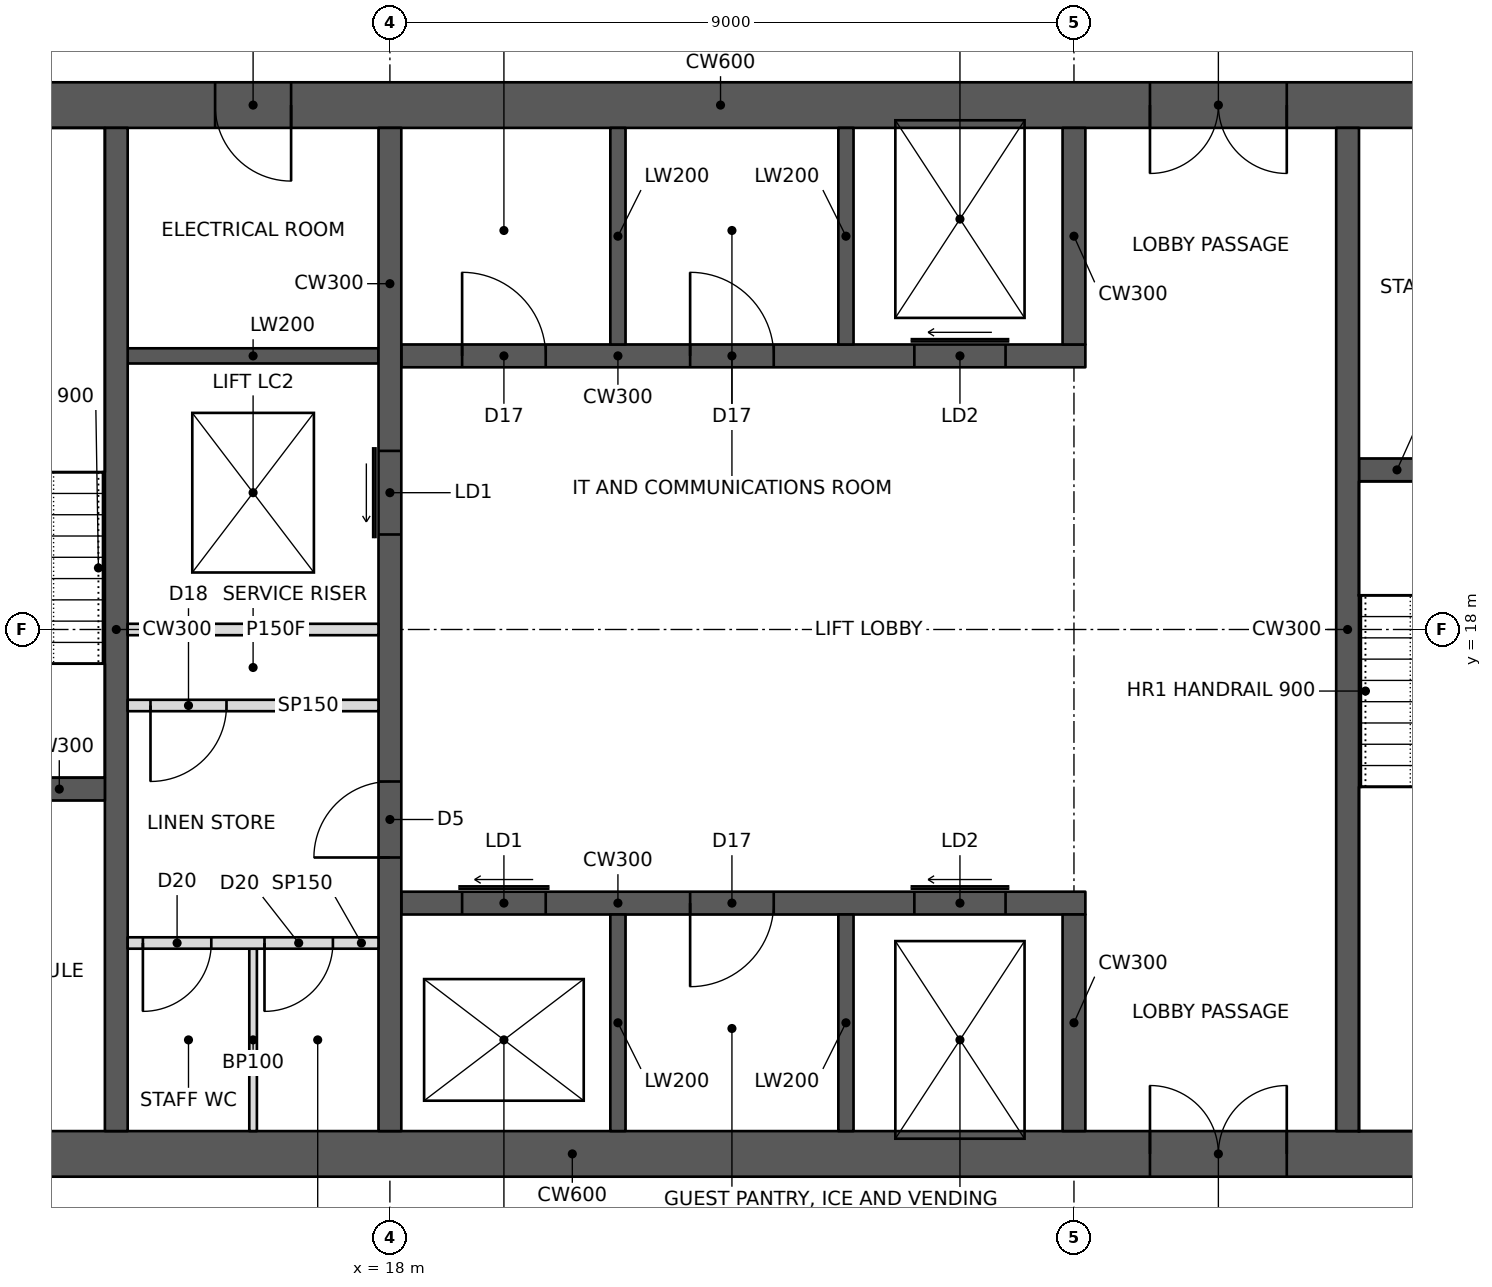
"""IFC4 building model, lengths in metres.
Left out: names, types, materials, properties, quantities, classifications, styles, units other than length and angle.
Written with IfcOpenShell. Run it as: python <this file> out.ifc"""

import sys

from ifc_helpers import new_model, si_unit, direction, frame, frame_2d, origin, place, context, subcontext, project, spatial, rectangle, extrude, element, fill, save


model = new_model("IFC4")
c1 = context("Model", 3, precision=1e-05, world=origin(), true_north=direction((0.0, 1.0)))
c2 = subcontext(c1, "Body", "Model", "MODEL_VIEW")
j1 = project(units=[si_unit("LENGTHUNIT", "METRE"), si_unit("PLANEANGLEUNIT", "RADIAN")], contexts=[c1])
p1 = place(None, origin())
s1 = spatial("IfcSite", under=j1, at=p1, CompositionType="ELEMENT")
p2 = place(p1, origin())
s2 = spatial("IfcBuilding", under=s1, at=p2, CompositionType="ELEMENT")
p3 = place(p2, frame((0.0, 0.0, 167.2)))
s3 = spatial("IfcBuildingStorey", under=s2, at=p3, CompositionType="ELEMENT", Elevation=167.2)
p4 = place(p3, frame((10.8, 11.1, 0.0), z_axis=(0.0, 0.0, 1.0), x_axis=(1.0, 0.0, 0.0)))
e1 = element("IfcWall", 1, at=p4, inside=s3, PredefinedType="SHEAR", context=c2, shape_type="SweptSolid", body=[
    extrude(rectangle(XDim=23.4, YDim=0.6, at=frame_2d((11.7, 0.0))), origin(), (0.0, 0.0, 1.0), 3.4),
])
p5 = place(p4, frame((1.0, 0.0, 0.0)))
e2 = element("IfcOpeningElement", 2, at=p5, cuts=e1, PredefinedType="OPENING", context=c2, shape_type="SweptSolid", body=[
    extrude(rectangle(XDim=1.0, YDim=2.1, at=frame_2d((0.5, 1.05))), frame((0.0, 0.31, 0.0), z_axis=(0.0, -1.0, 0.0), x_axis=(1.0, 0.0, 0.0)), (0.0, 0.0, 1.0), 0.62),
])
p6 = place(p4, frame((17.2, 0.0, 0.0)))
e3 = element("IfcOpeningElement", 3, at=p6, cuts=e1, PredefinedType="OPENING", context=c2, shape_type="SweptSolid", body=[
    extrude(rectangle(XDim=1.8, YDim=2.1, at=frame_2d((0.9, 1.05))), frame((0.0, 0.31, 0.0), z_axis=(0.0, -1.0, 0.0), x_axis=(1.0, 0.0, 0.0)), (0.0, 0.0, 1.0), 0.62),
])
p7 = place(p3, frame((10.8, 24.9, 0.0), z_axis=(0.0, 0.0, 1.0), x_axis=(1.0, 0.0, 0.0)))
e4 = element("IfcWall", 4, at=p7, inside=s3, PredefinedType="SHEAR", context=c2, shape_type="SweptSolid", body=[
    extrude(rectangle(XDim=23.4, YDim=0.6, at=frame_2d((11.7, 0.0))), origin(), (0.0, 0.0, 1.0), 3.4),
])
p8 = place(p7, frame((17.2, 0.0, 0.0)))
e5 = element("IfcOpeningElement", 5, at=p8, cuts=e4, PredefinedType="OPENING", context=c2, shape_type="SweptSolid", body=[
    extrude(rectangle(XDim=1.8, YDim=2.1, at=frame_2d((0.9, 1.05))), frame((0.0, 0.31, 0.0), z_axis=(0.0, -1.0, 0.0), x_axis=(1.0, 0.0, 0.0)), (0.0, 0.0, 1.0), 0.62),
])
p9 = place(p7, frame((21.1, 0.0, 0.0)))
e6 = element("IfcOpeningElement", 6, at=p9, cuts=e4, PredefinedType="OPENING", context=c2, shape_type="SweptSolid", body=[
    extrude(rectangle(XDim=1.0, YDim=2.1, at=frame_2d((0.5, 1.05))), frame((0.0, 0.31, 0.0), z_axis=(0.0, -1.0, 0.0), x_axis=(1.0, 0.0, 0.0)), (0.0, 0.0, 1.0), 0.62),
])
p10 = place(p7, frame((4.9, 0.0, 0.0)))
e7 = element("IfcOpeningElement", 7, at=p10, cuts=e4, PredefinedType="OPENING", context=c2, shape_type="SweptSolid", body=[
    extrude(rectangle(XDim=1.0, YDim=2.1, at=frame_2d((0.5, 1.05))), frame((0.0, 0.31, 0.0), z_axis=(0.0, -1.0, 0.0), x_axis=(1.0, 0.0, 0.0)), (0.0, 0.0, 1.0), 0.62),
])
p11 = place(p3, frame((14.4, 11.4, 0.0), z_axis=(0.0, 0.0, 1.0), x_axis=(0.0, 1.0, 0.0)))
e8 = element("IfcWall", 8, at=p11, inside=s3, PredefinedType="SHEAR", context=c2, shape_type="SweptSolid", body=[
    extrude(rectangle(XDim=13.2, YDim=0.3, at=frame_2d((6.6, 0.0))), origin(), (0.0, 0.0, 1.0), 3.4),
])
p12 = place(p3, frame((11.4, 15.9, 0.0), z_axis=(0.0, 0.0, 1.0), x_axis=(1.0, 0.0, 0.0)))
e9 = element("IfcWall", 9, at=p12, inside=s3, PredefinedType="SHEAR", context=c2, shape_type="SweptSolid", body=[
    extrude(rectangle(XDim=2.85, YDim=0.3, at=frame_2d((1.425, 0.0))), origin(), (0.0, 0.0, 1.0), 3.4),
])
p13 = place(p12, frame((0.5, 0.0, 0.0)))
e10 = element("IfcOpeningElement", 10, at=p13, cuts=e9, PredefinedType="OPENING", context=c2, shape_type="SweptSolid", body=[
    extrude(rectangle(XDim=1.0, YDim=2.1, at=frame_2d((0.5, 1.05))), frame((0.0, 0.16, 0.0), z_axis=(0.0, -1.0, 0.0), x_axis=(1.0, 0.0, 0.0)), (0.0, 0.0, 1.0), 0.32),
])
p14 = place(p3, frame((18.0, 11.4, 0.0), z_axis=(0.0, 0.0, 1.0), x_axis=(0.0, 1.0, 0.0)))
e11 = element("IfcWall", 11, at=p14, inside=s3, PredefinedType="SHEAR", context=c2, shape_type="SweptSolid", body=[
    extrude(rectangle(XDim=13.2, YDim=0.3, at=frame_2d((6.6, 0.0))), origin(), (0.0, 0.0, 1.0), 3.4),
])
p15 = place(p14, frame((3.6, 0.0, 0.0)))
e12 = element("IfcOpeningElement", 12, at=p15, cuts=e11, PredefinedType="OPENING", context=c2, shape_type="SweptSolid", body=[
    extrude(rectangle(XDim=1.0, YDim=2.1, at=frame_2d((0.5, 1.05))), frame((0.0, 0.16, 0.0), z_axis=(0.0, -1.0, 0.0), x_axis=(1.0, 0.0, 0.0)), (0.0, 0.0, 1.0), 0.32),
])
p16 = place(p14, frame((7.85, 0.0, 0.0)))
e13 = element("IfcOpeningElement", 13, at=p16, cuts=e11, PredefinedType="OPENING", context=c2, shape_type="SweptSolid", body=[
    extrude(rectangle(XDim=1.1, YDim=2.1, at=frame_2d((0.55, 1.05))), frame((0.0, 0.16, 0.0), z_axis=(0.0, -1.0, 0.0), x_axis=(1.0, 0.0, 0.0)), (0.0, 0.0, 1.0), 0.32),
])
p17 = place(p3, frame((14.55, 18.0, 0.0), z_axis=(0.0, 0.0, 1.0), x_axis=(1.0, 0.0, 0.0)))
e14 = element("IfcWall", 14, at=p17, inside=s3, PredefinedType="PARTITIONING", context=c2, shape_type="SweptSolid", body=[
    extrude(rectangle(XDim=3.3, YDim=0.15, at=frame_2d((1.65, 0.0))), origin(), (0.0, 0.0, 1.0), 3.2),
])
p18 = place(p3, frame((18.15, 14.4, 0.0), z_axis=(0.0, 0.0, 1.0), x_axis=(1.0, 0.0, 0.0)))
e15 = element("IfcWall", 15, at=p18, inside=s3, PredefinedType="SHEAR", context=c2, shape_type="SweptSolid", body=[
    extrude(rectangle(XDim=9.0, YDim=0.3, at=frame_2d((4.5, 0.0))), origin(), (0.0, 0.0, 1.0), 3.4),
])
p19 = place(p18, frame((0.8, 0.0, 0.0)))
e16 = element("IfcOpeningElement", 16, at=p19, cuts=e15, PredefinedType="OPENING", context=c2, shape_type="SweptSolid", body=[
    extrude(rectangle(XDim=1.1, YDim=2.1, at=frame_2d((0.55, 1.05))), frame((0.0, 0.16, 0.0), z_axis=(0.0, -1.0, 0.0), x_axis=(1.0, 0.0, 0.0)), (0.0, 0.0, 1.0), 0.32),
])
p20 = place(p18, frame((6.75, 0.0, 0.0)))
e17 = element("IfcOpeningElement", 17, at=p20, cuts=e15, PredefinedType="OPENING", context=c2, shape_type="SweptSolid", body=[
    extrude(rectangle(XDim=1.2, YDim=2.1, at=frame_2d((0.6, 1.05))), frame((0.0, 0.16, 0.0), z_axis=(0.0, -1.0, 0.0), x_axis=(1.0, 0.0, 0.0)), (0.0, 0.0, 1.0), 0.32),
])
p21 = place(p18, frame((3.8, 0.0, 0.0)))
e18 = element("IfcOpeningElement", 18, at=p21, cuts=e15, PredefinedType="OPENING", context=c2, shape_type="SweptSolid", body=[
    extrude(rectangle(XDim=1.1, YDim=2.1, at=frame_2d((0.55, 1.05))), frame((0.0, 0.16, 0.0), z_axis=(0.0, -1.0, 0.0), x_axis=(1.0, 0.0, 0.0)), (0.0, 0.0, 1.0), 0.32),
])
p22 = place(p3, frame((27.0, 11.4, 0.0), z_axis=(0.0, 0.0, 1.0), x_axis=(0.0, 1.0, 0.0)))
e19 = element("IfcWall", 19, at=p22, inside=s3, PredefinedType="SHEAR", context=c2, shape_type="SweptSolid", body=[
    extrude(rectangle(XDim=2.85, YDim=0.3, at=frame_2d((1.425, 0.0))), origin(), (0.0, 0.0, 1.0), 3.4),
])
for number, where, z_axis, x_axis in (
    (20, (21.0, 11.4, 0.0), (0.0, 0.0, 1.0), (0.0, 1.0, 0.0)),
    (21, (24.0, 11.4, 0.0), (0.0, 0.0, 1.0), (0.0, 1.0, 0.0)),
):
    element("IfcWall", number, at=place(p3, frame(where, z_axis=z_axis, x_axis=x_axis)), inside=s3, PredefinedType="SHEAR", context=c2, shape_type="SweptSolid", body=[
        extrude(rectangle(XDim=2.85, YDim=0.2, at=frame_2d((1.425, 0.0))), origin(), (0.0, 0.0, 1.0), 3.4),
    ])
p23 = place(p3, frame((18.15, 21.6, 0.0), z_axis=(0.0, 0.0, 1.0), x_axis=(1.0, 0.0, 0.0)))
e22 = element("IfcWall", 22, at=p23, inside=s3, PredefinedType="SHEAR", context=c2, shape_type="SweptSolid", body=[
    extrude(rectangle(XDim=9.0, YDim=0.3, at=frame_2d((4.5, 0.0))), origin(), (0.0, 0.0, 1.0), 3.4),
])
p24 = place(p23, frame((6.75, 0.0, 0.0)))
e23 = element("IfcOpeningElement", 23, at=p24, cuts=e22, PredefinedType="OPENING", context=c2, shape_type="SweptSolid", body=[
    extrude(rectangle(XDim=1.2, YDim=2.1, at=frame_2d((0.6, 1.05))), frame((0.0, 0.16, 0.0), z_axis=(0.0, -1.0, 0.0), x_axis=(1.0, 0.0, 0.0)), (0.0, 0.0, 1.0), 0.32),
])
p25 = place(p23, frame((0.8, 0.0, 0.0)))
e24 = element("IfcOpeningElement", 24, at=p25, cuts=e22, PredefinedType="OPENING", context=c2, shape_type="SweptSolid", body=[
    extrude(rectangle(XDim=1.1, YDim=2.1, at=frame_2d((0.55, 1.05))), frame((0.0, 0.16, 0.0), z_axis=(0.0, -1.0, 0.0), x_axis=(1.0, 0.0, 0.0)), (0.0, 0.0, 1.0), 0.32),
])
p26 = place(p23, frame((3.8, 0.0, 0.0)))
e25 = element("IfcOpeningElement", 25, at=p26, cuts=e22, PredefinedType="OPENING", context=c2, shape_type="SweptSolid", body=[
    extrude(rectangle(XDim=1.1, YDim=2.1, at=frame_2d((0.55, 1.05))), frame((0.0, 0.16, 0.0), z_axis=(0.0, -1.0, 0.0), x_axis=(1.0, 0.0, 0.0)), (0.0, 0.0, 1.0), 0.32),
])
p27 = place(p3, frame((27.0, 21.75, 0.0), z_axis=(0.0, 0.0, 1.0), x_axis=(0.0, 1.0, 0.0)))
e26 = element("IfcWall", 26, at=p27, inside=s3, PredefinedType="SHEAR", context=c2, shape_type="SweptSolid", body=[
    extrude(rectangle(XDim=2.85, YDim=0.3, at=frame_2d((1.425, 0.0))), origin(), (0.0, 0.0, 1.0), 3.4),
])
for number, where, z_axis, x_axis in (
    (27, (21.0, 21.75, 0.0), (0.0, 0.0, 1.0), (0.0, 1.0, 0.0)),
    (28, (24.0, 21.75, 0.0), (0.0, 0.0, 1.0), (0.0, 1.0, 0.0)),
):
    element("IfcWall", number, at=place(p3, frame(where, z_axis=z_axis, x_axis=x_axis)), inside=s3, PredefinedType="SHEAR", context=c2, shape_type="SweptSolid", body=[
        extrude(rectangle(XDim=2.85, YDim=0.2, at=frame_2d((1.425, 0.0))), origin(), (0.0, 0.0, 1.0), 3.4),
    ])
p28 = place(p3, frame((30.6, 11.4, 0.0), z_axis=(0.0, 0.0, 1.0), x_axis=(0.0, 1.0, 0.0)))
e29 = element("IfcWall", 29, at=p28, inside=s3, PredefinedType="SHEAR", context=c2, shape_type="SweptSolid", body=[
    extrude(rectangle(XDim=13.2, YDim=0.3, at=frame_2d((6.6, 0.0))), origin(), (0.0, 0.0, 1.0), 3.4),
])
p29 = place(p3, frame((30.75, 20.1, 0.0), z_axis=(0.0, 0.0, 1.0), x_axis=(1.0, 0.0, 0.0)))
e30 = element("IfcWall", 30, at=p29, inside=s3, PredefinedType="SHEAR", context=c2, shape_type="SweptSolid", body=[
    extrude(rectangle(XDim=2.85, YDim=0.3, at=frame_2d((1.425, 0.0))), origin(), (0.0, 0.0, 1.0), 3.4),
])
p30 = place(p29, frame((1.15, 0.0, 0.0)))
e31 = element("IfcOpeningElement", 31, at=p30, cuts=e30, PredefinedType="OPENING", context=c2, shape_type="SweptSolid", body=[
    extrude(rectangle(XDim=1.0, YDim=2.1, at=frame_2d((0.5, 1.05))), frame((0.0, 0.16, 0.0), z_axis=(0.0, -1.0, 0.0), x_axis=(1.0, 0.0, 0.0)), (0.0, 0.0, 1.0), 0.32),
])
p31 = place(p3, frame((14.55, 21.6, 0.0), z_axis=(0.0, 0.0, 1.0), x_axis=(1.0, 0.0, 0.0)))
e32 = element("IfcWall", 32, at=p31, inside=s3, PredefinedType="SHEAR", context=c2, shape_type="SweptSolid", body=[
    extrude(rectangle(XDim=3.3, YDim=0.2, at=frame_2d((1.65, 0.0))), origin(), (0.0, 0.0, 1.0), 3.4),
])
p32 = place(p3, frame((14.55, 17.0, 0.0), z_axis=(0.0, 0.0, 1.0), x_axis=(1.0, 0.0, 0.0)))
e33 = element("IfcWall", 33, at=p32, inside=s3, PredefinedType="PARTITIONING", context=c2, shape_type="SweptSolid", body=[
    extrude(rectangle(XDim=3.3, YDim=0.15, at=frame_2d((1.65, 0.0))), origin(), (0.0, 0.0, 1.0), 3.2),
])
p33 = place(p32, frame((0.3, 0.0, 0.0)))
e34 = element("IfcOpeningElement", 34, at=p33, cuts=e33, PredefinedType="OPENING", context=c2, shape_type="SweptSolid", body=[
    extrude(rectangle(XDim=1.0, YDim=2.1, at=frame_2d((0.5, 1.05))), frame((0.0, 0.085, 0.0), z_axis=(0.0, -1.0, 0.0), x_axis=(1.0, 0.0, 0.0)), (0.0, 0.0, 1.0), 0.17),
])
p34 = place(p3, frame((14.55, 13.875, 0.0), z_axis=(0.0, 0.0, 1.0), x_axis=(1.0, 0.0, 0.0)))
e35 = element("IfcWall", 35, at=p34, inside=s3, PredefinedType="PARTITIONING", context=c2, shape_type="SweptSolid", body=[
    extrude(rectangle(XDim=3.3, YDim=0.15, at=frame_2d((1.65, 0.0))), origin(), (0.0, 0.0, 1.0), 3.2),
])
p35 = place(p34, frame((0.2, 0.0, 0.0)))
e36 = element("IfcOpeningElement", 36, at=p35, cuts=e35, PredefinedType="OPENING", context=c2, shape_type="SweptSolid", body=[
    extrude(rectangle(XDim=0.9, YDim=2.1, at=frame_2d((0.45, 1.05))), frame((0.0, 0.085, 0.0), z_axis=(0.0, -1.0, 0.0), x_axis=(1.0, 0.0, 0.0)), (0.0, 0.0, 1.0), 0.17),
])
p36 = place(p34, frame((1.8, 0.0, 0.0)))
e37 = element("IfcOpeningElement", 37, at=p36, cuts=e35, PredefinedType="OPENING", context=c2, shape_type="SweptSolid", body=[
    extrude(rectangle(XDim=0.9, YDim=2.1, at=frame_2d((0.45, 1.05))), frame((0.0, 0.085, 0.0), z_axis=(0.0, -1.0, 0.0), x_axis=(1.0, 0.0, 0.0)), (0.0, 0.0, 1.0), 0.17),
])
p37 = place(p3, frame((16.2, 11.4, 0.0), z_axis=(0.0, 0.0, 1.0), x_axis=(0.0, 1.0, 0.0)))
e38 = element("IfcWall", 38, at=p37, inside=s3, PredefinedType="PARTITIONING", context=c2, shape_type="SweptSolid", body=[
    extrude(rectangle(XDim=2.4, YDim=0.1, at=frame_2d((1.2, 0.0))), origin(), (0.0, 0.0, 1.0), 3.2),
])
p38 = place(p33, frame((1.0, 0.0, 0.0), z_axis=(0.0, 0.0, 1.0), x_axis=(-1.0, 0.0, 0.0)))
e39 = element("IfcDoor", 39, at=p38, inside=s3, OperationType="SINGLE_SWING_RIGHT", PredefinedType="DOOR", context=c2, shape_type="SweptSolid", body=[
    extrude(rectangle(XDim=1.0, YDim=2.1, at=frame_2d((0.5, 1.05))), frame((0.0, 0.025, 0.0), z_axis=(0.0, -1.0, 0.0), x_axis=(1.0, 0.0, 0.0)), (0.0, 0.0, 1.0), 0.05),
])
fill(e34, e39)
p39 = place(p35, frame((0.9, 0.0, 0.0), z_axis=(0.0, 0.0, 1.0), x_axis=(-1.0, 0.0, 0.0)))
e40 = element("IfcDoor", 40, at=p39, inside=s3, OperationType="SINGLE_SWING_RIGHT", PredefinedType="DOOR", context=c2, shape_type="SweptSolid", body=[
    extrude(rectangle(XDim=0.9, YDim=2.1, at=frame_2d((0.45, 1.05))), frame((0.0, 0.025, 0.0), z_axis=(0.0, -1.0, 0.0), x_axis=(1.0, 0.0, 0.0)), (0.0, 0.0, 1.0), 0.05),
])
fill(e36, e40)
p40 = place(p36, frame((0.9, 0.0, 0.0), z_axis=(0.0, 0.0, 1.0), x_axis=(-1.0, 0.0, 0.0)))
e41 = element("IfcDoor", 41, at=p40, inside=s3, OperationType="SINGLE_SWING_RIGHT", PredefinedType="DOOR", context=c2, shape_type="SweptSolid", body=[
    extrude(rectangle(XDim=0.9, YDim=2.1, at=frame_2d((0.45, 1.05))), frame((0.0, 0.025, 0.0), z_axis=(0.0, -1.0, 0.0), x_axis=(1.0, 0.0, 0.0)), (0.0, 0.0, 1.0), 0.05),
])
fill(e37, e41)
p41 = place(p6, origin())
e42 = element("IfcDoor", 42, at=p41, inside=s3, OperationType="DOUBLE_DOOR_SINGLE_SWING", PredefinedType="DOOR", context=c2, shape_type="SweptSolid", body=[
    extrude(rectangle(XDim=1.8, YDim=2.1, at=frame_2d((0.9, 1.05))), frame((0.0, 0.025, 0.0), z_axis=(0.0, -1.0, 0.0), x_axis=(1.0, 0.0, 0.0)), (0.0, 0.0, 1.0), 0.05),
])
fill(e3, e42)
p42 = place(p8, frame((1.8, 0.0, 0.0), z_axis=(0.0, 0.0, 1.0), x_axis=(-1.0, 0.0, 0.0)))
e43 = element("IfcDoor", 43, at=p42, inside=s3, OperationType="DOUBLE_DOOR_SINGLE_SWING", PredefinedType="DOOR", context=c2, shape_type="SweptSolid", body=[
    extrude(rectangle(XDim=1.8, YDim=2.1, at=frame_2d((0.9, 1.05))), frame((0.0, 0.025, 0.0), z_axis=(0.0, -1.0, 0.0), x_axis=(1.0, 0.0, 0.0)), (0.0, 0.0, 1.0), 0.05),
])
fill(e5, e43)
p43 = place(p15, origin())
e44 = element("IfcDoor", 44, at=p43, inside=s3, OperationType="SINGLE_SWING_LEFT", PredefinedType="DOOR", context=c2, shape_type="SweptSolid", body=[
    extrude(rectangle(XDim=1.0, YDim=2.1, at=frame_2d((0.5, 1.05))), frame((0.0, 0.025, 0.0), z_axis=(0.0, -1.0, 0.0), x_axis=(1.0, 0.0, 0.0)), (0.0, 0.0, 1.0), 0.05),
])
fill(e12, e44)
p44 = place(p10, frame((1.0, 0.0, 0.0), z_axis=(0.0, 0.0, 1.0), x_axis=(-1.0, 0.0, 0.0)))
e45 = element("IfcDoor", 45, at=p44, inside=s3, OperationType="SINGLE_SWING_LEFT", PredefinedType="DOOR", context=c2, shape_type="SweptSolid", body=[
    extrude(rectangle(XDim=1.0, YDim=2.1, at=frame_2d((0.5, 1.05))), frame((0.0, 0.025, 0.0), z_axis=(0.0, -1.0, 0.0), x_axis=(1.0, 0.0, 0.0)), (0.0, 0.0, 1.0), 0.05),
])
fill(e7, e45)
p45 = place(p19, origin())
e46 = element("IfcDoor", 46, at=p45, inside=s3, OperationType="SLIDING_TO_LEFT", PredefinedType="DOOR", context=c2, shape_type="SweptSolid", body=[
    extrude(rectangle(XDim=1.1, YDim=2.1, at=frame_2d((0.55, 1.05))), frame((0.0, 0.025, 0.0), z_axis=(0.0, -1.0, 0.0), x_axis=(1.0, 0.0, 0.0)), (0.0, 0.0, 1.0), 0.05),
])
fill(e16, e46)
p46 = place(p16, origin())
e47 = element("IfcDoor", 47, at=p46, inside=s3, OperationType="SLIDING_TO_LEFT", PredefinedType="DOOR", context=c2, shape_type="SweptSolid", body=[
    extrude(rectangle(XDim=1.1, YDim=2.1, at=frame_2d((0.55, 1.05))), frame((0.0, 0.025, 0.0), z_axis=(0.0, -1.0, 0.0), x_axis=(1.0, 0.0, 0.0)), (0.0, 0.0, 1.0), 0.05),
])
fill(e13, e47)
p47 = place(p20, origin())
e48 = element("IfcDoor", 48, at=p47, inside=s3, OperationType="SLIDING_TO_LEFT", PredefinedType="DOOR", context=c2, shape_type="SweptSolid", body=[
    extrude(rectangle(XDim=1.2, YDim=2.1, at=frame_2d((0.6, 1.05))), frame((0.0, 0.025, 0.0), z_axis=(0.0, -1.0, 0.0), x_axis=(1.0, 0.0, 0.0)), (0.0, 0.0, 1.0), 0.05),
])
fill(e17, e48)
p48 = place(p24, origin())
e49 = element("IfcDoor", 49, at=p48, inside=s3, OperationType="SLIDING_TO_LEFT", PredefinedType="DOOR", context=c2, shape_type="SweptSolid", body=[
    extrude(rectangle(XDim=1.2, YDim=2.1, at=frame_2d((0.6, 1.05))), frame((0.0, 0.025, 0.0), z_axis=(0.0, -1.0, 0.0), x_axis=(1.0, 0.0, 0.0)), (0.0, 0.0, 1.0), 0.05),
])
fill(e23, e49)
p49 = place(p25, origin())
e50 = element("IfcDoor", 50, at=p49, inside=s3, OperationType="SINGLE_SWING_LEFT", PredefinedType="DOOR", context=c2, shape_type="SweptSolid", body=[
    extrude(rectangle(XDim=1.1, YDim=2.1, at=frame_2d((0.55, 1.05))), frame((0.0, 0.025, 0.0), z_axis=(0.0, -1.0, 0.0), x_axis=(1.0, 0.0, 0.0)), (0.0, 0.0, 1.0), 0.05),
])
fill(e24, e50)
p50 = place(p26, origin())
e51 = element("IfcDoor", 51, at=p50, inside=s3, OperationType="SINGLE_SWING_LEFT", PredefinedType="DOOR", context=c2, shape_type="SweptSolid", body=[
    extrude(rectangle(XDim=1.1, YDim=2.1, at=frame_2d((0.55, 1.05))), frame((0.0, 0.025, 0.0), z_axis=(0.0, -1.0, 0.0), x_axis=(1.0, 0.0, 0.0)), (0.0, 0.0, 1.0), 0.05),
])
fill(e25, e51)
p51 = place(p21, frame((1.1, 0.0, 0.0), z_axis=(0.0, 0.0, 1.0), x_axis=(-1.0, 0.0, 0.0)))
e52 = element("IfcDoor", 52, at=p51, inside=s3, OperationType="SINGLE_SWING_RIGHT", PredefinedType="DOOR", context=c2, shape_type="SweptSolid", body=[
    extrude(rectangle(XDim=1.1, YDim=2.1, at=frame_2d((0.55, 1.05))), frame((0.0, 0.025, 0.0), z_axis=(0.0, -1.0, 0.0), x_axis=(1.0, 0.0, 0.0)), (0.0, 0.0, 1.0), 0.05),
])
fill(e18, e52)
save(model, sys.argv[1])
